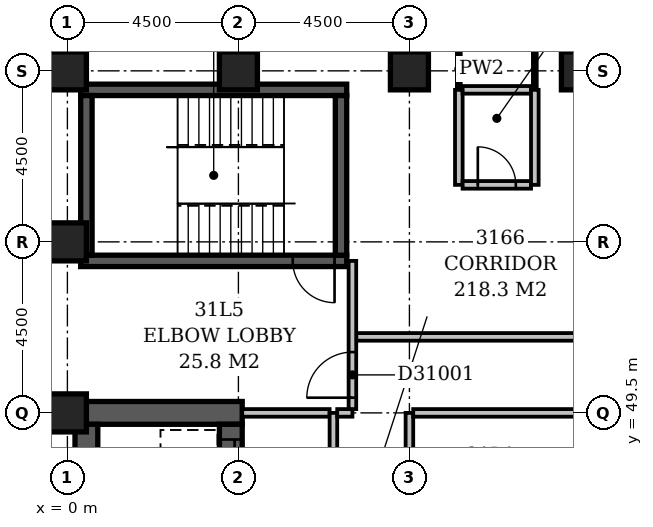
"""IFC4 building model, lengths in metres.
Left out: names, types, materials, properties, quantities, classifications, styles, units other than length and angle.
Written with IfcOpenShell. Run it as: python <this file> out.ifc"""

import sys

from ifc_helpers import new_model, si_unit, direction, frame, frame_2d, origin, origin_2d, place, context, subcontext, project, spatial, rectangle, extrude, element, fill, save


model = new_model("IFC4")
c1 = context("Model", 3, precision=1e-05, world=origin(), true_north=direction((0.0, 1.0)))
c2 = subcontext(c1, "Body", "Model", "MODEL_VIEW")
j1 = project(units=[si_unit("LENGTHUNIT", "METRE"), si_unit("PLANEANGLEUNIT", "RADIAN")], contexts=[c1])
p1 = place(None, origin())
s1 = spatial("IfcSite", under=j1, at=p1, CompositionType="ELEMENT")
p2 = place(p1, origin())
s2 = spatial("IfcBuilding", under=s1, at=p2, CompositionType="ELEMENT")
p3 = place(p2, frame((0.0, 0.0, 126.8)))
s3 = spatial("IfcBuildingStorey", under=s2, at=p3, CompositionType="ELEMENT", Elevation=126.8)
p4 = place(p3, frame((0.2, 49.5, -0.3), z_axis=(0.0, 0.0, 1.0), x_axis=(1.0, 0.0, 0.0)))
e1 = element("IfcWall", 1, at=p4, inside=s3, PredefinedType="SHEAR", context=c2, shape_type="SweptSolid", body=[
    extrude(rectangle(XDim=4.4, YDim=0.6, at=frame_2d((2.2, 0.0))), origin(), (0.0, 0.0, 1.0), 3.6),
])
p5 = place(p3, frame((0.35, 53.5, -0.3), z_axis=(0.0, 0.0, 1.0), x_axis=(1.0, 0.0, 0.0)))
e2 = element("IfcWall", 2, at=p5, inside=s3, PredefinedType="SHEAR", context=c2, shape_type="SweptSolid", body=[
    extrude(rectangle(XDim=7.0, YDim=0.3, at=frame_2d((3.5, 0.0))), origin(), (0.0, 0.0, 1.0), 3.6),
])
p6 = place(p5, frame((5.58, 0.0, 0.3)))
e3 = element("IfcOpeningElement", 3, at=p6, cuts=e2, PredefinedType="OPENING", context=c2, shape_type="SweptSolid", body=[
    extrude(rectangle(XDim=1.1, YDim=2.1, at=frame_2d((0.55, 1.05))), frame((0.0, 0.162, 0.0), z_axis=(0.0, -1.0, 0.0), x_axis=(1.0, 0.0, 0.0)), (0.0, 0.0, 1.0), 0.324),
])
p7 = place(p3, frame((0.35, 58.0, -0.3), z_axis=(0.0, 0.0, 1.0), x_axis=(1.0, 0.0, 0.0)))
e4 = element("IfcWall", 4, at=p7, inside=s3, PredefinedType="SHEAR", context=c2, shape_type="SweptSolid", body=[
    extrude(rectangle(XDim=7.0, YDim=0.3, at=frame_2d((3.5, 0.0))), origin(), (0.0, 0.0, 1.0), 3.6),
])
p8 = place(p3, frame((0.5, 27.15, -0.3), z_axis=(0.0, 0.0, 1.0), x_axis=(0.0, 1.0, 0.0)))
e5 = element("IfcWall", 5, at=p8, inside=s3, PredefinedType="SHEAR", context=c2, shape_type="SweptSolid", body=[
    extrude(rectangle(XDim=22.05, YDim=0.6, at=frame_2d((11.025, 0.0))), origin(), (0.0, 0.0, 1.0), 3.6),
])
p9 = place(p3, frame((0.5, 53.65, -0.3), z_axis=(0.0, 0.0, 1.0), x_axis=(0.0, 1.0, 0.0)))
e6 = element("IfcWall", 6, at=p9, inside=s3, PredefinedType="SHEAR", context=c2, shape_type="SweptSolid", body=[
    extrude(rectangle(XDim=4.2, YDim=0.3, at=frame_2d((2.1, 0.0))), origin(), (0.0, 0.0, 1.0), 3.6),
])
p10 = place(p3, frame((4.3, 27.15, -0.3), z_axis=(0.0, 0.0, 1.0), x_axis=(0.0, 1.0, 0.0)))
e7 = element("IfcWall", 7, at=p10, inside=s3, PredefinedType="SHEAR", context=c2, shape_type="SweptSolid", body=[
    extrude(rectangle(XDim=22.05, YDim=0.6, at=frame_2d((11.025, 0.0))), origin(), (0.0, 0.0, 1.0), 3.6),
])
p11 = place(p10, frame((3.05, 0.0, 0.3)))
e8 = element("IfcOpeningElement", 8, at=p11, cuts=e7, PredefinedType="OPENING", context=c2, shape_type="SweptSolid", body=[
    extrude(rectangle(XDim=1.1, YDim=2.1, at=frame_2d((0.55, 1.05))), frame((0.0, 0.312, 0.0), z_axis=(0.0, -1.0, 0.0), x_axis=(1.0, 0.0, 0.0)), (0.0, 0.0, 1.0), 0.624),
])
p12 = place(p10, frame((0.55, 0.0, 0.3)))
e9 = element("IfcOpeningElement", 9, at=p12, cuts=e7, PredefinedType="OPENING", context=c2, shape_type="SweptSolid", body=[
    extrude(rectangle(XDim=1.1, YDim=2.1, at=frame_2d((0.55, 1.05))), frame((0.0, 0.312, 0.0), z_axis=(0.0, -1.0, 0.0), x_axis=(1.0, 0.0, 0.0)), (0.0, 0.0, 1.0), 0.624),
])
p13 = place(p10, frame((20.55, 0.0, 0.3)))
e10 = element("IfcOpeningElement", 10, at=p13, cuts=e7, PredefinedType="OPENING", context=c2, shape_type="SweptSolid", body=[
    extrude(rectangle(XDim=1.1, YDim=2.1, at=frame_2d((0.55, 1.05))), frame((0.0, 0.312, 0.0), z_axis=(0.0, -1.0, 0.0), x_axis=(1.0, 0.0, 0.0)), (0.0, 0.0, 1.0), 0.624),
])
p14 = place(p10, frame((18.05, 0.0, 0.3)))
e11 = element("IfcOpeningElement", 11, at=p14, cuts=e7, PredefinedType="OPENING", context=c2, shape_type="SweptSolid", body=[
    extrude(rectangle(XDim=1.1, YDim=2.1, at=frame_2d((0.55, 1.05))), frame((0.0, 0.312, 0.0), z_axis=(0.0, -1.0, 0.0), x_axis=(1.0, 0.0, 0.0)), (0.0, 0.0, 1.0), 0.624),
])
p15 = place(p10, frame((15.55, 0.0, 0.3)))
e12 = element("IfcOpeningElement", 12, at=p15, cuts=e7, PredefinedType="OPENING", context=c2, shape_type="SweptSolid", body=[
    extrude(rectangle(XDim=1.1, YDim=2.1, at=frame_2d((0.55, 1.05))), frame((0.0, 0.312, 0.0), z_axis=(0.0, -1.0, 0.0), x_axis=(1.0, 0.0, 0.0)), (0.0, 0.0, 1.0), 0.624),
])
p16 = place(p10, frame((13.05, 0.0, 0.3)))
e13 = element("IfcOpeningElement", 13, at=p16, cuts=e7, PredefinedType="OPENING", context=c2, shape_type="SweptSolid", body=[
    extrude(rectangle(XDim=1.1, YDim=2.1, at=frame_2d((0.55, 1.05))), frame((0.0, 0.312, 0.0), z_axis=(0.0, -1.0, 0.0), x_axis=(1.0, 0.0, 0.0)), (0.0, 0.0, 1.0), 0.624),
])
p17 = place(p10, frame((10.55, 0.0, 0.3)))
e14 = element("IfcOpeningElement", 14, at=p17, cuts=e7, PredefinedType="OPENING", context=c2, shape_type="SweptSolid", body=[
    extrude(rectangle(XDim=1.1, YDim=2.1, at=frame_2d((0.55, 1.05))), frame((0.0, 0.312, 0.0), z_axis=(0.0, -1.0, 0.0), x_axis=(1.0, 0.0, 0.0)), (0.0, 0.0, 1.0), 0.624),
])
p18 = place(p10, frame((8.05, 0.0, 0.3)))
e15 = element("IfcOpeningElement", 15, at=p18, cuts=e7, PredefinedType="OPENING", context=c2, shape_type="SweptSolid", body=[
    extrude(rectangle(XDim=1.1, YDim=2.1, at=frame_2d((0.55, 1.05))), frame((0.0, 0.312, 0.0), z_axis=(0.0, -1.0, 0.0), x_axis=(1.0, 0.0, 0.0)), (0.0, 0.0, 1.0), 0.624),
])
p19 = place(p10, frame((5.55, 0.0, 0.3)))
e16 = element("IfcOpeningElement", 16, at=p19, cuts=e7, PredefinedType="OPENING", context=c2, shape_type="SweptSolid", body=[
    extrude(rectangle(XDim=1.1, YDim=2.1, at=frame_2d((0.55, 1.05))), frame((0.0, 0.312, 0.0), z_axis=(0.0, -1.0, 0.0), x_axis=(1.0, 0.0, 0.0)), (0.0, 0.0, 1.0), 0.624),
])
p20 = place(p3, frame((7.2, 53.65, -0.3), z_axis=(0.0, 0.0, 1.0), x_axis=(0.0, 1.0, 0.0)))
e17 = element("IfcWall", 17, at=p20, inside=s3, PredefinedType="SHEAR", context=c2, shape_type="SweptSolid", body=[
    extrude(rectangle(XDim=4.2, YDim=0.3, at=frame_2d((2.1, 0.0))), origin(), (0.0, 0.0, 1.0), 3.6),
])
for number, where, z_axis, x_axis in (
    (18, (0.0, 49.5, -0.3), (0.0, 0.0, 1.0), (1.0, 0.0, 0.0)),
    (19, (0.0, 54.0, -0.3), (0.0, 0.0, 1.0), (1.0, 0.0, 0.0)),
    (20, (0.0, 58.5, -0.3), (0.0, 0.0, 1.0), (1.0, 0.0, 0.0)),
    (21, (4.5, 58.5, -0.3), (0.0, 0.0, 1.0), (1.0, 0.0, 0.0)),
    (22, (9.0, 58.5, -0.3), (0.0, 0.0, 1.0), (1.0, 0.0, 0.0)),
    (23, (13.5, 58.5, -0.3), (0.0, 0.0, 1.0), (1.0, 0.0, 0.0)),
):
    element("IfcColumn", number, at=place(p3, frame(where, z_axis=z_axis, x_axis=x_axis)), inside=s3, PredefinedType="COLUMN", context=c2, shape_type="SweptSolid", body=[
        extrude(rectangle(XDim=1.0, YDim=1.0, at=origin_2d()), origin(), (0.0, 0.0, 1.0), 3.6),
    ])
p21 = place(p3, frame((7.0, 34.6, 0.0), z_axis=(0.0, 0.0, 1.0), x_axis=(0.0, 1.0, 0.0)))
e24 = element("IfcWall", 24, at=p21, inside=s3, PredefinedType="PARTITIONING", context=c2, shape_type="SweptSolid", body=[
    extrude(rectangle(XDim=14.9, YDim=0.2, at=frame_2d((7.45, 0.0))), origin(), (0.0, 0.0, 1.0), 3.3),
])
p22 = place(p21, frame((2.8, 0.0, 0.0)))
e25 = element("IfcOpeningElement", 25, at=p22, cuts=e24, PredefinedType="OPENING", context=c2, shape_type="SweptSolid", body=[
    extrude(rectangle(XDim=1.2, YDim=2.1, at=frame_2d((0.6, 1.05))), frame((0.0, 0.112, 0.0), z_axis=(0.0, -1.0, 0.0), x_axis=(1.0, 0.0, 0.0)), (0.0, 0.0, 1.0), 0.224),
])
p23 = place(p21, frame((9.8, 0.0, 0.0)))
e26 = element("IfcOpeningElement", 26, at=p23, cuts=e24, PredefinedType="OPENING", context=c2, shape_type="SweptSolid", body=[
    extrude(rectangle(XDim=1.2, YDim=2.1, at=frame_2d((0.6, 1.05))), frame((0.0, 0.112, 0.0), z_axis=(0.0, -1.0, 0.0), x_axis=(1.0, 0.0, 0.0)), (0.0, 0.0, 1.0), 0.224),
])
p24 = place(p3, frame((4.6, 49.5, 0.0), z_axis=(0.0, 0.0, 1.0), x_axis=(1.0, 0.0, 0.0)))
e27 = element("IfcWall", 27, at=p24, inside=s3, PredefinedType="PARTITIONING", context=c2, shape_type="SweptSolid", body=[
    extrude(rectangle(XDim=2.3, YDim=0.2, at=frame_2d((1.15, 0.0))), origin(), (0.0, 0.0, 1.0), 3.3),
])
p25 = place(p3, frame((7.1, 49.5, 0.0), z_axis=(0.0, 0.0, 1.0), x_axis=(1.0, 0.0, 0.0)))
e28 = element("IfcWall", 28, at=p25, inside=s3, PredefinedType="PARTITIONING", context=c2, shape_type="SweptSolid", body=[
    extrude(rectangle(XDim=0.4, YDim=0.2, at=frame_2d((0.2, 0.0))), origin(), (0.0, 0.0, 1.0), 3.3),
])
p26 = place(p3, frame((7.5, 49.6, 0.0), z_axis=(0.0, 0.0, 1.0), x_axis=(0.0, 1.0, 0.0)))
e29 = element("IfcWall", 29, at=p26, inside=s3, PredefinedType="PARTITIONING", context=c2, shape_type="SweptSolid", body=[
    extrude(rectangle(XDim=3.9, YDim=0.2, at=frame_2d((1.95, 0.0))), origin(), (0.0, 0.0, 1.0), 3.3),
])
p27 = place(p26, frame((0.3, 0.0, 0.0)))
e30 = element("IfcOpeningElement", 30, at=p27, cuts=e29, PredefinedType="OPENING", context=c2, shape_type="SweptSolid", body=[
    extrude(rectangle(XDim=1.2, YDim=2.1, at=frame_2d((0.6, 1.05))), frame((0.0, 0.112, 0.0), z_axis=(0.0, -1.0, 0.0), x_axis=(1.0, 0.0, 0.0)), (0.0, 0.0, 1.0), 0.224),
])
p28 = place(p3, frame((9.0, 34.75, 0.0), z_axis=(0.0, 0.0, 1.0), x_axis=(0.0, 1.0, 0.0)))
e31 = element("IfcWall", 31, at=p28, inside=s3, PredefinedType="PARTITIONING", context=c2, shape_type="SweptSolid", body=[
    extrude(rectangle(XDim=14.75, YDim=0.2, at=frame_2d((7.375, 0.0))), origin(), (0.0, 0.0, 1.0), 3.3),
])
p29 = place(p28, frame((7.5, 0.0, 0.0)))
e32 = element("IfcOpeningElement", 32, at=p29, cuts=e31, PredefinedType="OPENING", context=c2, shape_type="SweptSolid", body=[
    extrude(rectangle(XDim=0.9, YDim=2.1, at=frame_2d((0.45, 1.05))), frame((0.0, 0.112, 0.0), z_axis=(0.0, -1.0, 0.0), x_axis=(1.0, 0.0, 0.0)), (0.0, 0.0, 1.0), 0.224),
])
p30 = place(p3, frame((9.1, 49.5, 0.0), z_axis=(0.0, 0.0, 1.0), x_axis=(1.0, 0.0, 0.0)))
e33 = element("IfcWall", 33, at=p30, inside=s3, PredefinedType="PARTITIONING", context=c2, shape_type="SweptSolid", body=[
    extrude(rectangle(XDim=41.55, YDim=0.2, at=frame_2d((20.775, 0.0))), origin(), (0.0, 0.0, 1.0), 3.3),
])
p31 = place(p30, frame((13.7, 0.0, 0.0)))
e34 = element("IfcOpeningElement", 34, at=p31, cuts=e33, PredefinedType="OPENING", context=c2, shape_type="SweptSolid", body=[
    extrude(rectangle(XDim=1.0, YDim=2.1, at=frame_2d((0.5, 1.05))), frame((0.0, 0.112, 0.0), z_axis=(0.0, -1.0, 0.0), x_axis=(1.0, 0.0, 0.0)), (0.0, 0.0, 1.0), 0.224),
])
p32 = place(p30, frame((27.8, 0.0, 0.0)))
e35 = element("IfcOpeningElement", 35, at=p32, cuts=e33, PredefinedType="OPENING", context=c2, shape_type="SweptSolid", body=[
    extrude(rectangle(XDim=1.0, YDim=2.1, at=frame_2d((0.5, 1.05))), frame((0.0, 0.112, 0.0), z_axis=(0.0, -1.0, 0.0), x_axis=(1.0, 0.0, 0.0)), (0.0, 0.0, 1.0), 0.224),
])
p33 = place(p30, frame((8.4, 0.0, 0.0)))
e36 = element("IfcOpeningElement", 36, at=p33, cuts=e33, PredefinedType="OPENING", context=c2, shape_type="SweptSolid", body=[
    extrude(rectangle(XDim=0.9, YDim=2.1, at=frame_2d((0.45, 1.05))), frame((0.0, 0.112, 0.0), z_axis=(0.0, -1.0, 0.0), x_axis=(1.0, 0.0, 0.0)), (0.0, 0.0, 1.0), 0.224),
])
p34 = place(p3, frame((7.6, 51.5, 0.0), z_axis=(0.0, 0.0, 1.0), x_axis=(1.0, 0.0, 0.0)))
e37 = element("IfcWall", 37, at=p34, inside=s3, PredefinedType="PARTITIONING", context=c2, shape_type="SweptSolid", body=[
    extrude(rectangle(XDim=15.3, YDim=0.2, at=frame_2d((7.65, 0.0))), origin(), (0.0, 0.0, 1.0), 3.3),
])
p35 = place(p34, frame((7.2, 0.0, 0.0)))
e38 = element("IfcOpeningElement", 38, at=p35, cuts=e37, PredefinedType="OPENING", context=c2, shape_type="SweptSolid", body=[
    extrude(rectangle(XDim=0.9, YDim=2.1, at=frame_2d((0.45, 1.05))), frame((0.0, 0.112, 0.0), z_axis=(0.0, -1.0, 0.0), x_axis=(1.0, 0.0, 0.0)), (0.0, 0.0, 1.0), 0.224),
])
p36 = place(p3, frame((10.3, 55.5, 0.0), z_axis=(0.0, 0.0, 1.0), x_axis=(0.0, 1.0, 0.0)))
e39 = element("IfcWall", 39, at=p36, inside=s3, PredefinedType="PARTITIONING", context=c2, shape_type="SweptSolid", body=[
    extrude(rectangle(XDim=2.5, YDim=0.2, at=frame_2d((1.25, 0.0))), origin(), (0.0, 0.0, 1.0), 3.3),
])
p37 = place(p3, frame((10.4, 55.5, 0.0), z_axis=(0.0, 0.0, 1.0), x_axis=(1.0, 0.0, 0.0)))
e40 = element("IfcWall", 40, at=p37, inside=s3, PredefinedType="PARTITIONING", context=c2, shape_type="SweptSolid", body=[
    extrude(rectangle(XDim=1.8, YDim=0.2, at=frame_2d((0.9, 0.0))), origin(), (0.0, 0.0, 1.0), 3.3),
])
p38 = place(p37, frame((0.4, 0.0, 0.0)))
e41 = element("IfcOpeningElement", 41, at=p38, cuts=e40, PredefinedType="OPENING", context=c2, shape_type="SweptSolid", body=[
    extrude(rectangle(XDim=1.0, YDim=2.1, at=frame_2d((0.5, 1.05))), frame((0.0, 0.112, 0.0), z_axis=(0.0, -1.0, 0.0), x_axis=(1.0, 0.0, 0.0)), (0.0, 0.0, 1.0), 0.224),
])
p39 = place(p3, frame((12.3, 55.5, 0.0), z_axis=(0.0, 0.0, 1.0), x_axis=(0.0, 1.0, 0.0)))
e42 = element("IfcWall", 42, at=p39, inside=s3, PredefinedType="PARTITIONING", context=c2, shape_type="SweptSolid", body=[
    extrude(rectangle(XDim=2.5, YDim=0.2, at=frame_2d((1.25, 0.0))), origin(), (0.0, 0.0, 1.0), 3.3),
])
p40 = place(p3, frame((10.3, 58.0, 0.0), z_axis=(0.0, 0.0, 1.0), x_axis=(0.0, 1.0, 0.0)))
e43 = element("IfcWall", 43, at=p40, inside=s3, PredefinedType="PARTITIONING", context=c2, shape_type="SweptSolid", body=[
    extrude(rectangle(XDim=1.1, YDim=0.1, at=frame_2d((0.55, 0.0))), origin(), (0.0, 0.0, 1.0), 3.3),
])
p41 = place(p3, frame((10.4, 58.0, 0.0), z_axis=(0.0, 0.0, 1.0), x_axis=(1.0, 0.0, 0.0)))
e44 = element("IfcWall", 44, at=p41, inside=s3, PredefinedType="PARTITIONING", context=c2, shape_type="SweptSolid", body=[
    extrude(rectangle(XDim=1.8, YDim=0.2, at=frame_2d((0.9, 0.0))), origin(), (0.0, 0.0, 1.0), 3.3),
])
p42 = place(p3, frame((12.3, 58.0, 0.0), z_axis=(0.0, 0.0, 1.0), x_axis=(0.0, 1.0, 0.0)))
e45 = element("IfcWall", 45, at=p42, inside=s3, PredefinedType="PARTITIONING", context=c2, shape_type="SweptSolid", body=[
    extrude(rectangle(XDim=1.1, YDim=0.1, at=frame_2d((0.55, 0.0))), origin(), (0.0, 0.0, 1.0), 3.3),
])
p43 = place(p27, origin())
e46 = element("IfcDoor", 46, at=p43, inside=s3, OperationType="SINGLE_SWING_LEFT", PredefinedType="DOOR", context=c2, shape_type="SweptSolid", body=[
    extrude(rectangle(XDim=1.2, YDim=2.1, at=frame_2d((0.6, 1.05))), frame((0.0, 0.025, 0.0), z_axis=(0.0, -1.0, 0.0), x_axis=(1.0, 0.0, 0.0)), (0.0, 0.0, 1.0), 0.05),
])
fill(e30, e46)
p44 = place(p13, origin())
e47 = element("IfcDoor", 47, at=p44, inside=s3, OperationType="SLIDING_TO_LEFT", PredefinedType="DOOR", context=c2, shape_type="SweptSolid", body=[
    extrude(rectangle(XDim=1.1, YDim=2.1, at=frame_2d((0.55, 1.05))), frame((0.0, 0.025, 0.0), z_axis=(0.0, -1.0, 0.0), x_axis=(1.0, 0.0, 0.0)), (0.0, 0.0, 1.0), 0.05),
])
fill(e10, e47)
p45 = place(p6, origin())
e48 = element("IfcDoor", 48, at=p45, inside=s3, OperationType="SINGLE_SWING_RIGHT", PredefinedType="DOOR", context=c2, shape_type="SweptSolid", body=[
    extrude(rectangle(XDim=1.1, YDim=2.1, at=frame_2d((0.55, 1.05))), frame((0.0, 0.025, 0.0), z_axis=(0.0, -1.0, 0.0), x_axis=(1.0, 0.0, 0.0)), (0.0, 0.0, 1.0), 0.05),
])
fill(e3, e48)
p46 = place(p38, origin())
e49 = element("IfcDoor", 49, at=p46, inside=s3, OperationType="SINGLE_SWING_LEFT", PredefinedType="DOOR", context=c2, shape_type="SweptSolid", body=[
    extrude(rectangle(XDim=1.0, YDim=2.1, at=frame_2d((0.5, 1.05))), frame((0.0, 0.025, 0.0), z_axis=(0.0, -1.0, 0.0), x_axis=(1.0, 0.0, 0.0)), (0.0, 0.0, 1.0), 0.05),
])
fill(e41, e49)
save(model, sys.argv[1])
